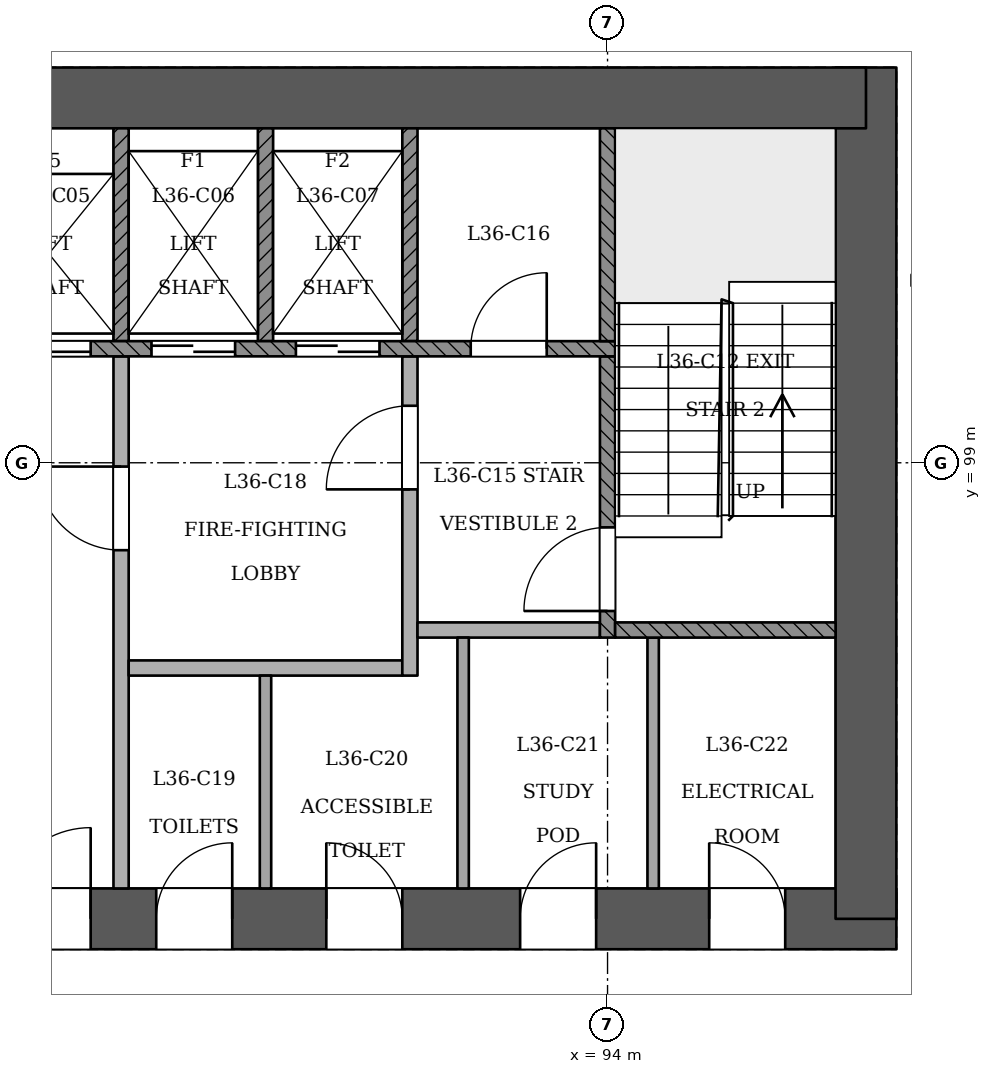
"""IFC4 building model, lengths in metres.
Left out: names, types, materials, properties, quantities, classifications, styles, units other than length and angle.
Written with IfcOpenShell. Run it as: python <this file> out.ifc"""

import sys

from ifc_helpers import new_model, si_unit, direction, frame, frame_2d, origin, place, context, subcontext, project, spatial, rectangle, extrude, element, fill, save


model = new_model("IFC4")
c1 = context("Model", 3, precision=1e-05, world=origin(), true_north=direction((0.0, 1.0)))
c2 = subcontext(c1, "Body", "Model", "MODEL_VIEW")
j1 = project(units=[si_unit("LENGTHUNIT", "METRE"), si_unit("PLANEANGLEUNIT", "RADIAN")], contexts=[c1])
p1 = place(None, origin())
s1 = spatial("IfcSite", under=j1, at=p1, CompositionType="ELEMENT")
p2 = place(p1, origin())
s2 = spatial("IfcBuilding", under=s1, at=p2, CompositionType="ELEMENT")
p3 = place(p2, frame((0.0, 0.0, 142.2)))
s3 = spatial("IfcBuildingStorey", under=s2, at=p3, CompositionType="ELEMENT", Elevation=142.2)
p4 = place(p3, frame((72.6, 93.0, 0.0), z_axis=(0.0, 0.0, 1.0), x_axis=(1.0, 0.0, 0.0)))
e1 = element("IfcWall", 1, at=p4, inside=s3, PredefinedType="SHEAR", context=c2, shape_type="SweptSolid", body=[
    extrude(rectangle(XDim=25.2, YDim=0.8, at=frame_2d((12.6, 0.0))), origin(), (0.0, 0.0, 1.0), 3.6),
])
p5 = place(p4, frame((1.2, 0.0, 0.0)))
e2 = element("IfcOpeningElement", 2, at=p5, cuts=e1, PredefinedType="OPENING", context=c2, shape_type="SweptSolid", body=[
    extrude(rectangle(XDim=1.2, YDim=2.1, at=frame_2d((0.6, 1.05))), frame((0.0, 0.411, 0.0), z_axis=(0.0, -1.0, 0.0), x_axis=(1.0, 0.0, 0.0)), (0.0, 0.0, 1.0), 0.821),
])
p6 = place(p4, frame((3.4, 0.0, 0.0)))
e3 = element("IfcOpeningElement", 3, at=p6, cuts=e1, PredefinedType="OPENING", context=c2, shape_type="SweptSolid", body=[
    extrude(rectangle(XDim=1.2, YDim=2.1, at=frame_2d((0.6, 1.05))), frame((0.0, 0.411, 0.0), z_axis=(0.0, -1.0, 0.0), x_axis=(1.0, 0.0, 0.0)), (0.0, 0.0, 1.0), 0.821),
])
p7 = place(p4, frame((13.4, 0.0, 0.0)))
e4 = element("IfcOpeningElement", 4, at=p7, cuts=e1, PredefinedType="OPENING", context=c2, shape_type="SweptSolid", body=[
    extrude(rectangle(XDim=1.2, YDim=2.1, at=frame_2d((0.6, 1.05))), frame((0.0, 0.411, 0.0), z_axis=(0.0, -1.0, 0.0), x_axis=(1.0, 0.0, 0.0)), (0.0, 0.0, 1.0), 0.821),
])
p8 = place(p4, frame((15.462, 0.0, 0.0)))
e5 = element("IfcOpeningElement", 5, at=p8, cuts=e1, PredefinedType="OPENING", context=c2, shape_type="SweptSolid", body=[
    extrude(rectangle(XDim=1.0, YDim=2.1, at=frame_2d((0.5, 1.05))), frame((0.0, 0.411, 0.0), z_axis=(0.0, -1.0, 0.0), x_axis=(1.0, 0.0, 0.0)), (0.0, 0.0, 1.0), 0.821),
])
p9 = place(p4, frame((17.7, 0.0, 0.0)))
e6 = element("IfcOpeningElement", 6, at=p9, cuts=e1, PredefinedType="OPENING", context=c2, shape_type="SweptSolid", body=[
    extrude(rectangle(XDim=1.0, YDim=2.1, at=frame_2d((0.5, 1.05))), frame((0.0, 0.411, 0.0), z_axis=(0.0, -1.0, 0.0), x_axis=(1.0, 0.0, 0.0)), (0.0, 0.0, 1.0), 0.821),
])
p10 = place(p4, frame((20.25, 0.0, 0.0)))
e7 = element("IfcOpeningElement", 7, at=p10, cuts=e1, PredefinedType="OPENING", context=c2, shape_type="SweptSolid", body=[
    extrude(rectangle(XDim=1.0, YDim=2.1, at=frame_2d((0.5, 1.05))), frame((0.0, 0.411, 0.0), z_axis=(0.0, -1.0, 0.0), x_axis=(1.0, 0.0, 0.0)), (0.0, 0.0, 1.0), 0.821),
])
p11 = place(p4, frame((22.738, 0.0, 0.0)))
e8 = element("IfcOpeningElement", 8, at=p11, cuts=e1, PredefinedType="OPENING", context=c2, shape_type="SweptSolid", body=[
    extrude(rectangle(XDim=1.0, YDim=2.1, at=frame_2d((0.5, 1.05))), frame((0.0, 0.411, 0.0), z_axis=(0.0, -1.0, 0.0), x_axis=(1.0, 0.0, 0.0)), (0.0, 0.0, 1.0), 0.821),
])
p12 = place(p3, frame((97.4, 93.0, 0.0), z_axis=(0.0, 0.0, 1.0), x_axis=(0.0, 1.0, 0.0)))
e9 = element("IfcWall", 9, at=p12, inside=s3, PredefinedType="SHEAR", context=c2, shape_type="SweptSolid", body=[
    extrude(rectangle(XDim=11.2, YDim=0.8, at=frame_2d((5.6, 0.0))), origin(), (0.0, 0.0, 1.0), 3.6),
])
p13 = place(p3, frame((97.4, 103.8, 0.0), z_axis=(0.0, 0.0, 1.0), x_axis=(-1.0, 0.0, 0.0)))
e10 = element("IfcWall", 10, at=p13, inside=s3, PredefinedType="SHEAR", context=c2, shape_type="SweptSolid", body=[
    extrude(rectangle(XDim=25.2, YDim=0.8, at=frame_2d((12.6, 0.0))), origin(), (0.0, 0.0, 1.0), 3.6),
])
p14 = place(p3, frame((85.065, 63.98, 0.0), z_axis=(0.0, 0.0, 1.0), x_axis=(0.499427357949, 0.866355766491, 0.0)))
e11 = element("IfcWall", 11, at=p14, inside=s3, PredefinedType="PARTITIONING", context=c2, shape_type="SweptSolid", body=[
    extrude(rectangle(XDim=41.02, YDim=0.15, at=frame_2d((20.51, 0.0))), origin(), (0.0, 0.0, 1.0), 2.75),
])
p15 = place(p14, frame((0.382, 0.0, 0.0)))
e12 = element("IfcOpeningElement", 12, at=p15, cuts=e11, PredefinedType="OPENING", context=c2, shape_type="SweptSolid", body=[
    extrude(rectangle(XDim=1.2, YDim=2.1, at=frame_2d((0.6, 1.05))), frame((0.0, 0.085, 0.0), z_axis=(0.0, -1.0, 0.0), x_axis=(1.0, 0.0, 0.0)), (0.0, 0.0, 1.0), 0.171),
])
p16 = place(p14, frame((2.583, 0.0, 0.0)))
e13 = element("IfcOpeningElement", 13, at=p16, cuts=e11, PredefinedType="OPENING", context=c2, shape_type="SweptSolid", body=[
    extrude(rectangle(XDim=1.0, YDim=2.1, at=frame_2d((0.5, 1.05))), frame((0.0, 0.085, 0.0), z_axis=(0.0, -1.0, 0.0), x_axis=(1.0, 0.0, 0.0)), (0.0, 0.0, 1.0), 0.171),
])
p17 = place(p14, frame((8.113, 0.0, 0.0)))
e14 = element("IfcOpeningElement", 14, at=p17, cuts=e11, PredefinedType="OPENING", context=c2, shape_type="SweptSolid", body=[
    extrude(rectangle(XDim=1.0, YDim=2.1, at=frame_2d((0.5, 1.05))), frame((0.0, 0.085, 0.0), z_axis=(0.0, -1.0, 0.0), x_axis=(1.0, 0.0, 0.0)), (0.0, 0.0, 1.0), 0.171),
])
p18 = place(p14, frame((11.467, 0.0, 0.0)))
e15 = element("IfcOpeningElement", 15, at=p18, cuts=e11, PredefinedType="OPENING", context=c2, shape_type="SweptSolid", body=[
    extrude(rectangle(XDim=1.0, YDim=2.1, at=frame_2d((0.5, 1.05))), frame((0.0, 0.085, 0.0), z_axis=(0.0, -1.0, 0.0), x_axis=(1.0, 0.0, 0.0)), (0.0, 0.0, 1.0), 0.171),
])
p19 = place(p14, frame((18.142, 0.0, 0.0)))
e16 = element("IfcOpeningElement", 16, at=p19, cuts=e11, PredefinedType="OPENING", context=c2, shape_type="SweptSolid", body=[
    extrude(rectangle(XDim=1.0, YDim=2.1, at=frame_2d((0.5, 1.05))), frame((0.0, 0.085, 0.0), z_axis=(0.0, -1.0, 0.0), x_axis=(1.0, 0.0, 0.0)), (0.0, 0.0, 1.0), 0.171),
])
p20 = place(p14, frame((20.583, 0.0, 0.0)))
e17 = element("IfcOpeningElement", 17, at=p20, cuts=e11, PredefinedType="OPENING", context=c2, shape_type="SweptSolid", body=[
    extrude(rectangle(XDim=1.0, YDim=2.1, at=frame_2d((0.5, 1.05))), frame((0.0, 0.085, 0.0), z_axis=(0.0, -1.0, 0.0), x_axis=(1.0, 0.0, 0.0)), (0.0, 0.0, 1.0), 0.171),
])
p21 = place(p14, frame((26.113, 0.0, 0.0)))
e18 = element("IfcOpeningElement", 18, at=p21, cuts=e11, PredefinedType="OPENING", context=c2, shape_type="SweptSolid", body=[
    extrude(rectangle(XDim=1.0, YDim=2.1, at=frame_2d((0.5, 1.05))), frame((0.0, 0.085, 0.0), z_axis=(0.0, -1.0, 0.0), x_axis=(1.0, 0.0, 0.0)), (0.0, 0.0, 1.0), 0.171),
])
p22 = place(p14, frame((33.863, 0.0, 0.0)))
e19 = element("IfcOpeningElement", 19, at=p22, cuts=e11, PredefinedType="OPENING", context=c2, shape_type="SweptSolid", body=[
    extrude(rectangle(XDim=1.2, YDim=2.1, at=frame_2d((0.6, 1.05))), frame((0.0, 0.085, 0.0), z_axis=(0.0, -1.0, 0.0), x_axis=(1.0, 0.0, 0.0)), (0.0, 0.0, 1.0), 0.171),
])
p23 = place(p14, frame((39.545, 0.0, 0.0)))
e20 = element("IfcOpeningElement", 20, at=p23, cuts=e11, PredefinedType="OPENING", context=c2, shape_type="SweptSolid", body=[
    extrude(rectangle(XDim=1.2, YDim=2.1, at=frame_2d((0.6, 1.05))), frame((0.0, 0.085, 0.0), z_axis=(0.0, -1.0, 0.0), x_axis=(1.0, 0.0, 0.0)), (0.0, 0.0, 1.0), 0.171),
])
p24 = place(p3, frame((99.726, 101.4, 0.0), z_axis=(0.0, 0.0, 1.0), x_axis=(-0.999999959988, 0.00028288542, 0.0)))
e21 = element("IfcWall", 21, at=p24, inside=s3, PredefinedType="PARTITIONING", context=c2, shape_type="SweptSolid", body=[
    extrude(rectangle(XDim=1.726, YDim=0.15, at=frame_2d((0.863, 0.0))), origin(), (0.0, 0.0, 1.0), 3.15),
])
p25 = place(p3, frame((87.6, 93.4, 0.0), z_axis=(0.0, 0.0, 1.0), x_axis=(0.0, 1.0, 0.0)))
e22 = element("IfcWall", 22, at=p25, inside=s3, PredefinedType="PARTITIONING", context=c2, shape_type="SweptSolid", body=[
    extrude(rectangle(XDim=7.0, YDim=0.2, at=frame_2d((3.5, 0.0))), origin(), (0.0, 0.0, 1.0), 3.15),
])
p26 = place(p25, frame((4.45, 0.0, 0.0)))
e23 = element("IfcOpeningElement", 23, at=p26, cuts=e22, PredefinedType="OPENING", context=c2, shape_type="SweptSolid", body=[
    extrude(rectangle(XDim=1.1, YDim=2.1, at=frame_2d((0.55, 1.05))), frame((0.0, 0.11, 0.0), z_axis=(0.0, -1.0, 0.0), x_axis=(1.0, 0.0, 0.0)), (0.0, 0.0, 1.0), 0.221),
])
p27 = place(p3, frame((89.5, 93.4, 0.0), z_axis=(0.0, 0.0, 1.0), x_axis=(0.0, 1.0, 0.0)))
e24 = element("IfcWall", 24, at=p27, inside=s3, PredefinedType="PARTITIONING", context=c2, shape_type="SweptSolid", body=[
    extrude(rectangle(XDim=2.8, YDim=0.15, at=frame_2d((1.4, 0.0))), origin(), (0.0, 0.0, 1.0), 3.15),
])
for number, where, z_axis, x_axis in (
    (25, (92.1, 93.4, 0.0), (0.0, 0.0, 1.0), (0.0, 1.0, 0.0)),
    (26, (94.6, 93.4, 0.0), (0.0, 0.0, 1.0), (0.0, 1.0, 0.0)),
):
    element("IfcWall", number, at=place(p3, frame(where, z_axis=z_axis, x_axis=x_axis)), inside=s3, PredefinedType="PARTITIONING", context=c2, shape_type="SweptSolid", body=[
        extrude(rectangle(XDim=3.3, YDim=0.15, at=frame_2d((1.65, 0.0))), origin(), (0.0, 0.0, 1.0), 3.15),
    ])
p28 = place(p3, frame((87.7, 96.3, 0.0), z_axis=(0.0, 0.0, 1.0), x_axis=(1.0, 0.0, 0.0)))
e27 = element("IfcWall", 27, at=p28, inside=s3, PredefinedType="PARTITIONING", context=c2, shape_type="SweptSolid", body=[
    extrude(rectangle(XDim=3.6, YDim=0.2, at=frame_2d((1.8, 0.0))), origin(), (0.0, 0.0, 1.0), 3.15),
])
p29 = place(p3, frame((91.4, 96.2, 0.0), z_axis=(0.0, 0.0, 1.0), x_axis=(0.0, 1.0, 0.0)))
e28 = element("IfcWall", 28, at=p29, inside=s3, PredefinedType="PARTITIONING", context=c2, shape_type="SweptSolid", body=[
    extrude(rectangle(XDim=4.2, YDim=0.2, at=frame_2d((2.1, 0.0))), origin(), (0.0, 0.0, 1.0), 3.15),
])
p30 = place(p29, frame((2.45, 0.0, 0.0)))
e29 = element("IfcOpeningElement", 29, at=p30, cuts=e28, PredefinedType="OPENING", context=c2, shape_type="SweptSolid", body=[
    extrude(rectangle(XDim=1.1, YDim=2.1, at=frame_2d((0.55, 1.05))), frame((0.0, 0.11, 0.0), z_axis=(0.0, -1.0, 0.0), x_axis=(1.0, 0.0, 0.0)), (0.0, 0.0, 1.0), 0.221),
])
p31 = place(p3, frame((91.5, 96.8, 0.0), z_axis=(0.0, 0.0, 1.0), x_axis=(1.0, 0.0, 0.0)))
e30 = element("IfcWall", 30, at=p31, inside=s3, PredefinedType="PARTITIONING", context=c2, shape_type="SweptSolid", body=[
    extrude(rectangle(XDim=2.4, YDim=0.2, at=frame_2d((1.2, 0.0))), origin(), (0.0, 0.0, 1.0), 3.15),
])
p32 = place(p3, frame((94.0, 96.7, 0.0), z_axis=(0.0, 0.0, 1.0), x_axis=(0.0, 1.0, 0.0)))
e31 = element("IfcWall", 31, at=p32, inside=s3, PredefinedType="SOLIDWALL", context=c2, shape_type="SweptSolid", body=[
    extrude(rectangle(XDim=3.7, YDim=0.2, at=frame_2d((1.85, 0.0))), origin(), (0.0, 0.0, 1.0), 3.15),
])
p33 = place(p32, frame((0.35, 0.0, 0.0)))
e32 = element("IfcOpeningElement", 32, at=p33, cuts=e31, PredefinedType="OPENING", context=c2, shape_type="SweptSolid", body=[
    extrude(rectangle(XDim=1.1, YDim=2.1, at=frame_2d((0.55, 1.05))), frame((0.0, 0.11, 0.0), z_axis=(0.0, -1.0, 0.0), x_axis=(1.0, 0.0, 0.0)), (0.0, 0.0, 1.0), 0.221),
])
p34 = place(p3, frame((94.1, 96.8, 0.0), z_axis=(0.0, 0.0, 1.0), x_axis=(1.0, 0.0, 0.0)))
e33 = element("IfcWall", 33, at=p34, inside=s3, PredefinedType="SOLIDWALL", context=c2, shape_type="SweptSolid", body=[
    extrude(rectangle(XDim=2.9, YDim=0.2, at=frame_2d((1.45, 0.0))), origin(), (0.0, 0.0, 1.0), 3.15),
])
p35 = place(p3, frame((75.9, 100.5, 0.0), z_axis=(0.0, 0.0, 1.0), x_axis=(1.0, 0.0, 0.0)))
e34 = element("IfcWall", 34, at=p35, inside=s3, PredefinedType="SOLIDWALL", context=c2, shape_type="SweptSolid", body=[
    extrude(rectangle(XDim=18.2, YDim=0.2, at=frame_2d((9.1, 0.0))), origin(), (0.0, 0.0, 1.0), 3.15),
])
p36 = place(p35, frame((2.6, 0.0, 0.0)))
e35 = element("IfcOpeningElement", 35, at=p36, cuts=e34, PredefinedType="OPENING", context=c2, shape_type="SweptSolid", body=[
    extrude(rectangle(XDim=1.1, YDim=2.1, at=frame_2d((0.55, 1.05))), frame((0.0, 0.11, 0.0), z_axis=(0.0, -1.0, 0.0), x_axis=(1.0, 0.0, 0.0)), (0.0, 0.0, 1.0), 0.221),
])
p37 = place(p35, frame((4.5, 0.0, 0.0)))
e36 = element("IfcOpeningElement", 36, at=p37, cuts=e34, PredefinedType="OPENING", context=c2, shape_type="SweptSolid", body=[
    extrude(rectangle(XDim=1.1, YDim=2.1, at=frame_2d((0.55, 1.05))), frame((0.0, 0.11, 0.0), z_axis=(0.0, -1.0, 0.0), x_axis=(1.0, 0.0, 0.0)), (0.0, 0.0, 1.0), 0.221),
])
p38 = place(p35, frame((6.4, 0.0, 0.0)))
e37 = element("IfcOpeningElement", 37, at=p38, cuts=e34, PredefinedType="OPENING", context=c2, shape_type="SweptSolid", body=[
    extrude(rectangle(XDim=1.1, YDim=2.1, at=frame_2d((0.55, 1.05))), frame((0.0, 0.11, 0.0), z_axis=(0.0, -1.0, 0.0), x_axis=(1.0, 0.0, 0.0)), (0.0, 0.0, 1.0), 0.221),
])
p39 = place(p35, frame((8.3, 0.0, 0.0)))
e38 = element("IfcOpeningElement", 38, at=p39, cuts=e34, PredefinedType="OPENING", context=c2, shape_type="SweptSolid", body=[
    extrude(rectangle(XDim=1.1, YDim=2.1, at=frame_2d((0.55, 1.05))), frame((0.0, 0.11, 0.0), z_axis=(0.0, -1.0, 0.0), x_axis=(1.0, 0.0, 0.0)), (0.0, 0.0, 1.0), 0.221),
])
p40 = place(p35, frame((10.2, 0.0, 0.0)))
e39 = element("IfcOpeningElement", 39, at=p40, cuts=e34, PredefinedType="OPENING", context=c2, shape_type="SweptSolid", body=[
    extrude(rectangle(XDim=1.1, YDim=2.1, at=frame_2d((0.55, 1.05))), frame((0.0, 0.11, 0.0), z_axis=(0.0, -1.0, 0.0), x_axis=(1.0, 0.0, 0.0)), (0.0, 0.0, 1.0), 0.221),
])
p41 = place(p35, frame((12.1, 0.0, 0.0)))
e40 = element("IfcOpeningElement", 40, at=p41, cuts=e34, PredefinedType="OPENING", context=c2, shape_type="SweptSolid", body=[
    extrude(rectangle(XDim=1.1, YDim=2.1, at=frame_2d((0.55, 1.05))), frame((0.0, 0.11, 0.0), z_axis=(0.0, -1.0, 0.0), x_axis=(1.0, 0.0, 0.0)), (0.0, 0.0, 1.0), 0.221),
])
p42 = place(p35, frame((14.0, 0.0, 0.0)))
e41 = element("IfcOpeningElement", 41, at=p42, cuts=e34, PredefinedType="OPENING", context=c2, shape_type="SweptSolid", body=[
    extrude(rectangle(XDim=1.1, YDim=2.1, at=frame_2d((0.55, 1.05))), frame((0.0, 0.11, 0.0), z_axis=(0.0, -1.0, 0.0), x_axis=(1.0, 0.0, 0.0)), (0.0, 0.0, 1.0), 0.221),
])
p43 = place(p35, frame((0.65, 0.0, 0.0)))
e42 = element("IfcOpeningElement", 42, at=p43, cuts=e34, PredefinedType="OPENING", context=c2, shape_type="SweptSolid", body=[
    extrude(rectangle(XDim=1.0, YDim=2.1, at=frame_2d((0.5, 1.05))), frame((0.0, 0.11, 0.0), z_axis=(0.0, -1.0, 0.0), x_axis=(1.0, 0.0, 0.0)), (0.0, 0.0, 1.0), 0.221),
])
p44 = place(p35, frame((16.3, 0.0, 0.0)))
e43 = element("IfcOpeningElement", 43, at=p44, cuts=e34, PredefinedType="OPENING", context=c2, shape_type="SweptSolid", body=[
    extrude(rectangle(XDim=1.0, YDim=2.1, at=frame_2d((0.5, 1.05))), frame((0.0, 0.11, 0.0), z_axis=(0.0, -1.0, 0.0), x_axis=(1.0, 0.0, 0.0)), (0.0, 0.0, 1.0), 0.221),
])
for number, where, z_axis, x_axis in (
    (44, (87.6, 100.6, 0.0), (0.0, 0.0, 1.0), (0.0, 1.0, 0.0)),
    (45, (89.5, 100.6, 0.0), (0.0, 0.0, 1.0), (0.0, 1.0, 0.0)),
    (46, (91.4, 100.6, 0.0), (0.0, 0.0, 1.0), (0.0, 1.0, 0.0)),
    (47, (94.0, 100.6, 0.0), (0.0, 0.0, 1.0), (0.0, 1.0, 0.0)),
):
    element("IfcWall", number, at=place(p3, frame(where, z_axis=z_axis, x_axis=x_axis)), inside=s3, PredefinedType="SOLIDWALL", context=c2, shape_type="SweptSolid", body=[
        extrude(rectangle(XDim=2.8, YDim=0.2, at=frame_2d((1.4, 0.0))), origin(), (0.0, 0.0, 1.0), 3.15),
    ])
p45 = place(p40, origin())
e48 = element("IfcDoor", 48, at=p45, inside=s3, OperationType="SLIDING_TO_RIGHT", PredefinedType="NOTDEFINED", context=c2, shape_type="SweptSolid", body=[
    extrude(rectangle(XDim=1.1, YDim=2.1, at=frame_2d((0.55, 1.05))), frame((0.0, 0.025, 0.0), z_axis=(0.0, -1.0, 0.0), x_axis=(1.0, 0.0, 0.0)), (0.0, 0.0, 1.0), 0.05),
])
fill(e39, e48)
p46 = place(p41, origin())
e49 = element("IfcDoor", 49, at=p46, inside=s3, OperationType="SLIDING_TO_RIGHT", PredefinedType="NOTDEFINED", context=c2, shape_type="SweptSolid", body=[
    extrude(rectangle(XDim=1.1, YDim=2.1, at=frame_2d((0.55, 1.05))), frame((0.0, 0.025, 0.0), z_axis=(0.0, -1.0, 0.0), x_axis=(1.0, 0.0, 0.0)), (0.0, 0.0, 1.0), 0.05),
])
fill(e40, e49)
p47 = place(p42, origin())
e50 = element("IfcDoor", 50, at=p47, inside=s3, OperationType="SLIDING_TO_LEFT", PredefinedType="NOTDEFINED", context=c2, shape_type="SweptSolid", body=[
    extrude(rectangle(XDim=1.1, YDim=2.1, at=frame_2d((0.55, 1.05))), frame((0.0, 0.025, 0.0), z_axis=(0.0, -1.0, 0.0), x_axis=(1.0, 0.0, 0.0)), (0.0, 0.0, 1.0), 0.05),
])
fill(e41, e50)
p48 = place(p33, origin())
e51 = element("IfcDoor", 51, at=p48, inside=s3, OperationType="SINGLE_SWING_LEFT", PredefinedType="NOTDEFINED", context=c2, shape_type="SweptSolid", body=[
    extrude(rectangle(XDim=1.1, YDim=2.1, at=frame_2d((0.55, 1.05))), frame((0.0, 0.025, 0.0), z_axis=(0.0, -1.0, 0.0), x_axis=(1.0, 0.0, 0.0)), (0.0, 0.0, 1.0), 0.05),
])
fill(e32, e51)
p49 = place(p26, origin())
e52 = element("IfcDoor", 52, at=p49, inside=s3, OperationType="SINGLE_SWING_RIGHT", PredefinedType="NOTDEFINED", context=c2, shape_type="SweptSolid", body=[
    extrude(rectangle(XDim=1.1, YDim=2.1, at=frame_2d((0.55, 1.05))), frame((0.0, 0.025, 0.0), z_axis=(0.0, -1.0, 0.0), x_axis=(1.0, 0.0, 0.0)), (0.0, 0.0, 1.0), 0.05),
])
fill(e23, e52)
p50 = place(p30, origin())
e53 = element("IfcDoor", 53, at=p50, inside=s3, OperationType="SINGLE_SWING_LEFT", PredefinedType="NOTDEFINED", context=c2, shape_type="SweptSolid", body=[
    extrude(rectangle(XDim=1.1, YDim=2.1, at=frame_2d((0.55, 1.05))), frame((0.0, 0.025, 0.0), z_axis=(0.0, -1.0, 0.0), x_axis=(1.0, 0.0, 0.0)), (0.0, 0.0, 1.0), 0.05),
])
fill(e29, e53)
p51 = place(p7, origin())
e54 = element("IfcDoor", 54, at=p51, inside=s3, OperationType="SINGLE_SWING_RIGHT", PredefinedType="NOTDEFINED", context=c2, shape_type="SweptSolid", body=[
    extrude(rectangle(XDim=1.2, YDim=2.1, at=frame_2d((0.6, 1.05))), frame((0.0, 0.025, 0.0), z_axis=(0.0, -1.0, 0.0), x_axis=(1.0, 0.0, 0.0)), (0.0, 0.0, 1.0), 0.05),
])
fill(e4, e54)
p52 = place(p44, origin())
e55 = element("IfcDoor", 55, at=p52, inside=s3, OperationType="SINGLE_SWING_RIGHT", PredefinedType="NOTDEFINED", context=c2, shape_type="SweptSolid", body=[
    extrude(rectangle(XDim=1.0, YDim=2.1, at=frame_2d((0.5, 1.05))), frame((0.0, 0.025, 0.0), z_axis=(0.0, -1.0, 0.0), x_axis=(1.0, 0.0, 0.0)), (0.0, 0.0, 1.0), 0.05),
])
fill(e43, e55)
p53 = place(p8, origin())
e56 = element("IfcDoor", 56, at=p53, inside=s3, OperationType="SINGLE_SWING_RIGHT", PredefinedType="NOTDEFINED", context=c2, shape_type="SweptSolid", body=[
    extrude(rectangle(XDim=1.0, YDim=2.1, at=frame_2d((0.5, 1.05))), frame((0.0, 0.025, 0.0), z_axis=(0.0, -1.0, 0.0), x_axis=(1.0, 0.0, 0.0)), (0.0, 0.0, 1.0), 0.05),
])
fill(e5, e56)
p54 = place(p9, origin())
e57 = element("IfcDoor", 57, at=p54, inside=s3, OperationType="SINGLE_SWING_LEFT", PredefinedType="NOTDEFINED", context=c2, shape_type="SweptSolid", body=[
    extrude(rectangle(XDim=1.0, YDim=2.1, at=frame_2d((0.5, 1.05))), frame((0.0, 0.025, 0.0), z_axis=(0.0, -1.0, 0.0), x_axis=(1.0, 0.0, 0.0)), (0.0, 0.0, 1.0), 0.05),
])
fill(e6, e57)
p55 = place(p10, origin())
e58 = element("IfcDoor", 58, at=p55, inside=s3, OperationType="SINGLE_SWING_RIGHT", PredefinedType="NOTDEFINED", context=c2, shape_type="SweptSolid", body=[
    extrude(rectangle(XDim=1.0, YDim=2.1, at=frame_2d((0.5, 1.05))), frame((0.0, 0.025, 0.0), z_axis=(0.0, -1.0, 0.0), x_axis=(1.0, 0.0, 0.0)), (0.0, 0.0, 1.0), 0.05),
])
fill(e7, e58)
p56 = place(p11, origin())
e59 = element("IfcDoor", 59, at=p56, inside=s3, OperationType="SINGLE_SWING_LEFT", PredefinedType="NOTDEFINED", context=c2, shape_type="SweptSolid", body=[
    extrude(rectangle(XDim=1.0, YDim=2.1, at=frame_2d((0.5, 1.05))), frame((0.0, 0.025, 0.0), z_axis=(0.0, -1.0, 0.0), x_axis=(1.0, 0.0, 0.0)), (0.0, 0.0, 1.0), 0.05),
])
fill(e8, e59)
save(model, sys.argv[1])
